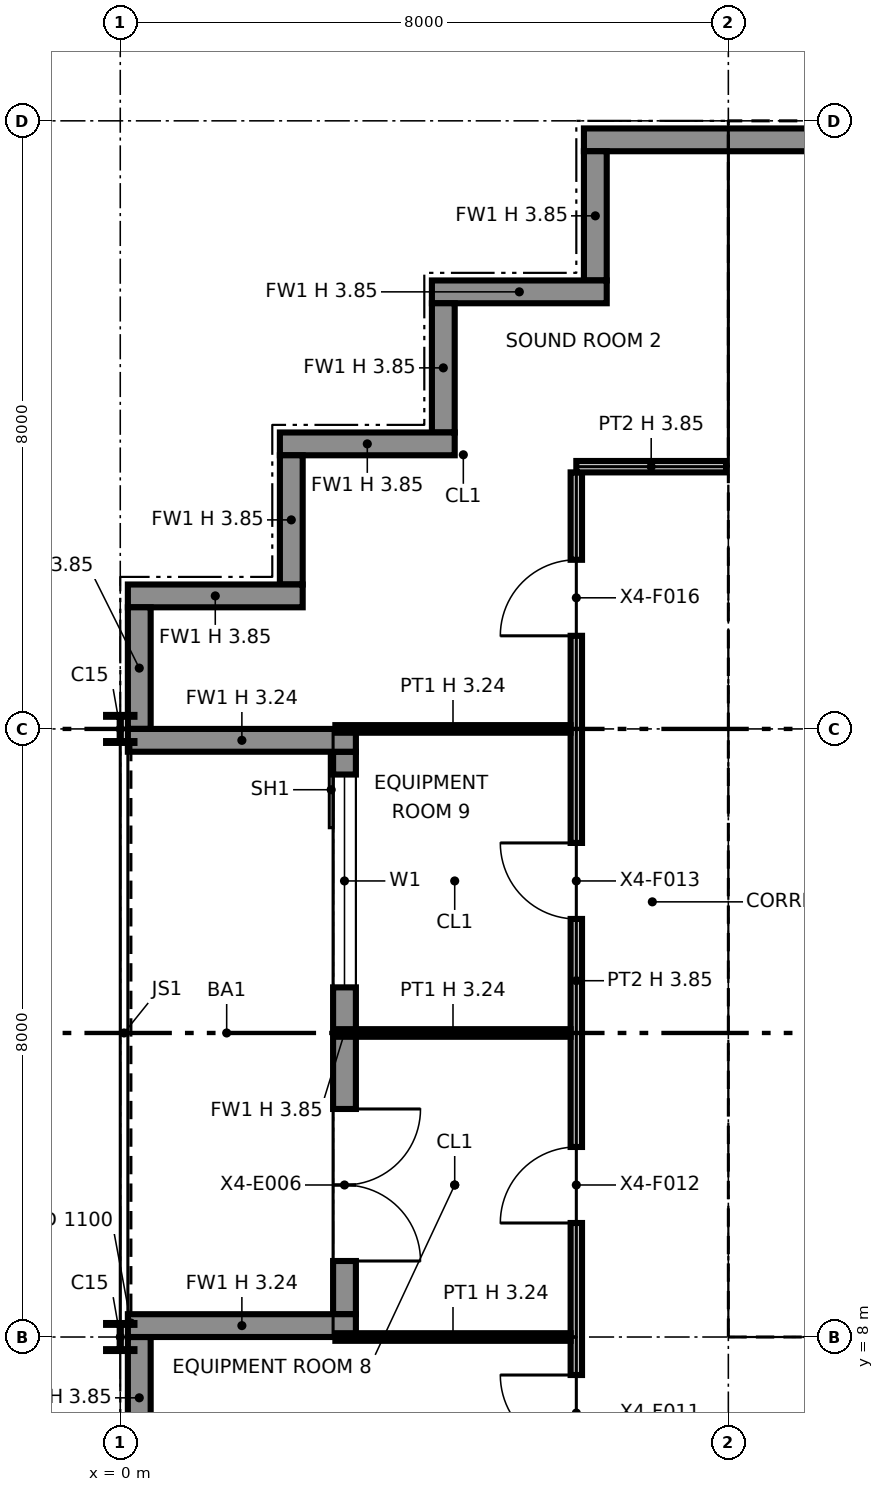
"""IFC4 building model, lengths in metres.
Left out: names, types, materials, properties, quantities, classifications, styles, units other than length and angle.
Written with IfcOpenShell. Run it as: python <this file> out.ifc"""

import sys

from ifc_helpers import new_model, si_unit, direction, frame, frame_2d, origin, origin_2d, place, context, subcontext, project, spatial, polyline, rectangle, i_section, outline, extrude, element, fill, save


model = new_model("IFC4")
c1 = context("Model", 3, precision=1e-05, world=origin(), true_north=direction((0.0, 1.0)))
c2 = subcontext(c1, "Body", "Model", "MODEL_VIEW")
j1 = project(units=[si_unit("LENGTHUNIT", "METRE"), si_unit("PLANEANGLEUNIT", "RADIAN")], contexts=[c1])
p1 = place(None, origin())
s1 = spatial("IfcSite", under=j1, at=p1, CompositionType="ELEMENT")
p2 = place(p1, origin())
s2 = spatial("IfcBuilding", under=s1, at=p2, CompositionType="ELEMENT")
p3 = place(p2, frame((0.0, 0.0, 275.0)))
s3 = spatial("IfcBuildingStorey", under=s2, at=p3, CompositionType="ELEMENT", Elevation=275.0)
for number, where, z_axis, x_axis in (
    (1, (0.0, 8.0, 0.0), (0.0, 0.0, 1.0), (1.0, 0.0, 0.0)),
    (2, (0.0, 16.0, 0.0), (0.0, 0.0, 1.0), (1.0, 0.0, 0.0)),
):
    element("IfcColumn", number, at=place(p3, frame(where, z_axis=z_axis, x_axis=x_axis)), inside=s3, PredefinedType="COLUMN", context=c2, shape_type="SweptSolid", body=[
        extrude(i_section(OverallWidth=0.373, OverallDepth=0.368, WebThickness=0.015, FlangeThickness=0.024, at=origin_2d()), origin(), (0.0, 0.0, 1.0), 3.85),
    ])
for number, where, z_axis, x_axis in (
    (3, (8.0, 8.0, 0.0), (0.0, 0.0, 1.0), (1.0, 0.0, 0.0)),
    (4, (8.0, 16.0, 0.0), (0.0, 0.0, 1.0), (1.0, 0.0, 0.0)),
):
    element("IfcColumn", number, at=place(p3, frame(where, z_axis=z_axis, x_axis=x_axis)), inside=s3, PredefinedType="COLUMN", context=c2, shape_type="SweptSolid", body=[
        extrude(i_section(OverallWidth=0.257, OverallDepth=0.363, WebThickness=0.013, FlangeThickness=0.022, at=origin_2d()), origin(), (0.0, 0.0, 1.0), 3.85),
    ])
p4 = place(p3, frame((8.0, 24.0, 0.0), z_axis=(0.0, 0.0, 1.0), x_axis=(1.0, 0.0, 0.0)))
e5 = element("IfcColumn", 5, at=p4, inside=s3, PredefinedType="COLUMN", context=c2, shape_type="SweptSolid", body=[
    extrude(i_section(OverallWidth=0.399, OverallDepth=0.386, WebThickness=0.021, FlangeThickness=0.033, at=origin_2d()), origin(), (0.0, 0.0, 1.0), 3.85),
])
p5 = place(p3, frame((32.0, 23.75, 0.0), z_axis=(0.0, 0.0, 1.0), x_axis=(-1.0, 0.0, 0.0)))
e6 = element("IfcWall", 6, at=p5, inside=s3, PredefinedType="SOLIDWALL", context=c2, shape_type="SweptSolid", body=[
    extrude(rectangle(XDim=25.9, YDim=0.3, at=frame_2d((12.95, 0.0))), origin(), (0.0, 0.0, 1.0), 3.85),
])
p6 = place(p3, frame((6.25, 23.6, 0.0), z_axis=(0.0, 0.0, 1.0), x_axis=(0.0, -1.0, 0.0)))
e7 = element("IfcWall", 7, at=p6, inside=s3, PredefinedType="SOLIDWALL", context=c2, shape_type="SweptSolid", body=[
    extrude(rectangle(XDim=1.7, YDim=0.3, at=frame_2d((0.85, 0.0))), origin(), (0.0, 0.0, 1.0), 3.85),
])
p7 = place(p3, frame((6.4, 21.75, 0.0), z_axis=(0.0, 0.0, 1.0), x_axis=(-1.0, 0.0, 0.0)))
e8 = element("IfcWall", 8, at=p7, inside=s3, PredefinedType="SOLIDWALL", context=c2, shape_type="SweptSolid", body=[
    extrude(rectangle(XDim=2.3, YDim=0.3, at=frame_2d((1.15, 0.0))), origin(), (0.0, 0.0, 1.0), 3.85),
])
p8 = place(p3, frame((4.25, 21.6, 0.0), z_axis=(0.0, 0.0, 1.0), x_axis=(0.0, -1.0, 0.0)))
e9 = element("IfcWall", 9, at=p8, inside=s3, PredefinedType="SOLIDWALL", context=c2, shape_type="SweptSolid", body=[
    extrude(rectangle(XDim=1.7, YDim=0.3, at=frame_2d((0.85, 0.0))), origin(), (0.0, 0.0, 1.0), 3.85),
])
p9 = place(p3, frame((4.4, 19.75, 0.0), z_axis=(0.0, 0.0, 1.0), x_axis=(-1.0, 0.0, 0.0)))
e10 = element("IfcWall", 10, at=p9, inside=s3, PredefinedType="SOLIDWALL", context=c2, shape_type="SweptSolid", body=[
    extrude(rectangle(XDim=2.3, YDim=0.3, at=frame_2d((1.15, 0.0))), origin(), (0.0, 0.0, 1.0), 3.85),
])
p10 = place(p3, frame((2.25, 19.6, 0.0), z_axis=(0.0, 0.0, 1.0), x_axis=(0.0, -1.0, 0.0)))
e11 = element("IfcWall", 11, at=p10, inside=s3, PredefinedType="SOLIDWALL", context=c2, shape_type="SweptSolid", body=[
    extrude(rectangle(XDim=1.7, YDim=0.3, at=frame_2d((0.85, 0.0))), origin(), (0.0, 0.0, 1.0), 3.85),
])
p11 = place(p3, frame((2.4, 17.75, 0.0), z_axis=(0.0, 0.0, 1.0), x_axis=(-1.0, 0.0, 0.0)))
e12 = element("IfcWall", 12, at=p11, inside=s3, PredefinedType="SOLIDWALL", context=c2, shape_type="SweptSolid", body=[
    extrude(rectangle(XDim=2.3, YDim=0.3, at=frame_2d((1.15, 0.0))), origin(), (0.0, 0.0, 1.0), 3.85),
])
p12 = place(p3, frame((0.25, 17.6, 0.0), z_axis=(0.0, 0.0, 1.0), x_axis=(0.0, -1.0, 0.0)))
e13 = element("IfcWall", 13, at=p12, inside=s3, PredefinedType="SOLIDWALL", context=c2, shape_type="SweptSolid", body=[
    extrude(rectangle(XDim=1.6, YDim=0.3, at=frame_2d((0.8, 0.0))), origin(), (0.0, 0.0, 1.0), 3.85),
])
p13 = place(p3, frame((2.95, 15.7, 0.0), z_axis=(0.0, 0.0, 1.0), x_axis=(0.0, -1.0, 0.0)))
e14 = element("IfcWall", 14, at=p13, inside=s3, PredefinedType="SOLIDWALL", context=c2, shape_type="SweptSolid", body=[
    extrude(rectangle(XDim=7.4, YDim=0.3, at=frame_2d((3.7, 0.0))), origin(), (0.0, 0.0, 1.0), 3.85),
])
p14 = place(p13, frame((0.3, 0.0, 0.9)))
e15 = element("IfcOpeningElement", 15, at=p14, cuts=e14, PredefinedType="OPENING", context=c2, shape_type="SweptSolid", body=[
    extrude(rectangle(XDim=2.8, YDim=2.2, at=frame_2d((1.4, 1.1))), frame((0.0, 0.16, 0.0), z_axis=(0.0, -1.0, 0.0), x_axis=(1.0, 0.0, 0.0)), (0.0, 0.0, 1.0), 0.32),
])
p15 = place(p13, frame((4.7, 0.0, 0.0)))
e16 = element("IfcOpeningElement", 16, at=p15, cuts=e14, PredefinedType="OPENING", context=c2, shape_type="SweptSolid", body=[
    extrude(rectangle(XDim=2.0, YDim=2.4, at=frame_2d((1.0, 1.2))), frame((0.0, 0.16, 0.0), z_axis=(0.0, -1.0, 0.0), x_axis=(1.0, 0.0, 0.0)), (0.0, 0.0, 1.0), 0.32),
])
for number, where, z_axis, x_axis in (
    (17, (0.1, 15.85, 0.0), (0.0, 0.0, 1.0), (1.0, 0.0, 0.0)),
    (18, (0.1, 8.15, 0.0), (0.0, 0.0, 1.0), (1.0, 0.0, 0.0)),
):
    element("IfcWall", number, at=place(p3, frame(where, z_axis=z_axis, x_axis=x_axis)), inside=s3, PredefinedType="SOLIDWALL", context=c2, shape_type="SweptSolid", body=[
        extrude(rectangle(XDim=3.0, YDim=0.3, at=frame_2d((1.5, 0.0))), origin(), (0.0, 0.0, 1.0), 3.237),
    ])
p16 = place(p3, frame((0.25, 8.0, 0.0), z_axis=(0.0, 0.0, 1.0), x_axis=(0.0, -1.0, 0.0)))
e19 = element("IfcWall", 19, at=p16, inside=s3, PredefinedType="SOLIDWALL", context=c2, shape_type="SweptSolid", body=[
    extrude(rectangle(XDim=1.6, YDim=0.3, at=frame_2d((0.8, 0.0))), origin(), (0.0, 0.0, 1.0), 3.85),
])
p17 = place(p3, frame((8.65, 8.75, 0.0), z_axis=(0.0, 0.0, 1.0), x_axis=(1.0, 0.0, 0.0)))
e20 = element("IfcWall", 20, at=p17, inside=s3, PredefinedType="PARTITIONING", context=c2, shape_type="SweptSolid", body=[
    extrude(outline(polyline([(0.0, 0.0), (14.7, 0.0), (14.7, 3.85), (7.438, 3.85), (7.437, 3.318), (7.263, 3.318), (7.262, 3.85), (0.0, 3.85), (0.0, 0.0)])), frame((0.0, 0.1, 0.0), z_axis=(0.0, -1.0, 0.0), x_axis=(1.0, 0.0, 0.0)), (0.0, 0.0, 1.0), 0.2),
])
p18 = place(p17, frame((1.3, 0.0, 0.0)))
e21 = element("IfcOpeningElement", 21, at=p18, cuts=e20, PredefinedType="OPENING", context=c2, shape_type="SweptSolid", body=[
    extrude(rectangle(XDim=1.4, YDim=2.1, at=frame_2d((0.7, 1.05))), frame((0.0, 0.11, 0.0), z_axis=(0.0, -1.0, 0.0), x_axis=(1.0, 0.0, 0.0)), (0.0, 0.0, 1.0), 0.22),
])
p19 = place(p17, frame((4.6, 0.0, 0.0)))
e22 = element("IfcOpeningElement", 22, at=p19, cuts=e20, PredefinedType="OPENING", context=c2, shape_type="SweptSolid", body=[
    extrude(rectangle(XDim=1.4, YDim=2.1, at=frame_2d((0.7, 1.05))), frame((0.0, 0.11, 0.0), z_axis=(0.0, -1.0, 0.0), x_axis=(1.0, 0.0, 0.0)), (0.0, 0.0, 1.0), 0.22),
])
p20 = place(p17, frame((10.4, 0.0, 0.0)))
e23 = element("IfcOpeningElement", 23, at=p20, cuts=e20, PredefinedType="OPENING", context=c2, shape_type="SweptSolid", body=[
    extrude(rectangle(XDim=1.2, YDim=2.1, at=frame_2d((0.6, 1.05))), frame((0.0, 0.11, 0.0), z_axis=(0.0, -1.0, 0.0), x_axis=(1.0, 0.0, 0.0)), (0.0, 0.0, 1.0), 0.22),
])
p21 = place(p3, frame((8.75, 8.85, 0.0), z_axis=(0.0, 0.0, 1.0), x_axis=(0.0, 1.0, 0.0)))
e24 = element("IfcWall", 24, at=p21, inside=s3, PredefinedType="PARTITIONING", context=c2, shape_type="SweptSolid", body=[
    extrude(outline(polyline([(0.0, 0.0), (14.3, 0.0), (14.3, 3.85), (10.225, 3.85), (10.224, 3.44), (10.076, 3.44), (10.075, 3.85), (7.238, 3.85), (7.237, 3.318), (7.063, 3.318), (7.062, 3.85), (0.0, 3.85), (0.0, 0.0)])), frame((0.0, 0.1, 0.0), z_axis=(0.0, -1.0, 0.0), x_axis=(1.0, 0.0, 0.0)), (0.0, 0.0, 1.0), 0.2),
])
p22 = place(p21, frame((8.3, 0.0, 0.0)))
e25 = element("IfcOpeningElement", 25, at=p22, cuts=e24, PredefinedType="OPENING", context=c2, shape_type="SweptSolid", body=[
    extrude(rectangle(XDim=1.8, YDim=2.1, at=frame_2d((0.9, 1.05))), frame((0.0, 0.11, 0.0), z_axis=(0.0, -1.0, 0.0), x_axis=(1.0, 0.0, 0.0)), (0.0, 0.0, 1.0), 0.22),
])
p23 = place(p3, frame((8.65, 23.25, 0.0), z_axis=(0.0, 0.0, 1.0), x_axis=(1.0, 0.0, 0.0)))
e26 = element("IfcWall", 26, at=p23, inside=s3, PredefinedType="PARTITIONING", context=c2, shape_type="SweptSolid", body=[
    extrude(outline(polyline([(0.0, 0.0), (14.7, 0.0), (14.7, 3.85), (7.438, 3.85), (7.437, 3.318), (7.263, 3.318), (7.262, 3.85), (0.0, 3.85), (0.0, 0.0)])), frame((0.0, 0.1, 0.0), z_axis=(0.0, -1.0, 0.0), x_axis=(1.0, 0.0, 0.0)), (0.0, 0.0, 1.0), 0.2),
])
p24 = place(p3, frame((8.85, 16.0, 0.0), z_axis=(0.0, 0.0, 1.0), x_axis=(1.0, 0.0, 0.0)))
e27 = element("IfcWall", 27, at=p24, inside=s3, PredefinedType="PARTITIONING", context=c2, shape_type="SweptSolid", body=[
    extrude(rectangle(XDim=6.958, YDim=0.6, at=frame_2d((3.479, 0.0))), origin(), (0.0, 0.0, 1.0), 3.318),
])
p25 = place(p3, frame((8.85, 19.9, 0.0), z_axis=(0.0, 0.0, 1.0), x_axis=(1.0, 0.0, 0.0)))
e28 = element("IfcWall", 28, at=p25, inside=s3, PredefinedType="PARTITIONING", context=c2, shape_type="SweptSolid", body=[
    extrude(outline(polyline([(0.0, 0.0), (14.3, 0.0), (14.3, 3.85), (7.238, 3.85), (7.237, 3.318), (7.063, 3.318), (7.062, 3.85), (0.0, 3.85), (0.0, 0.0)])), frame((0.0, 0.1, 0.0), z_axis=(0.0, -1.0, 0.0), x_axis=(1.0, 0.0, 0.0)), (0.0, 0.0, 1.0), 0.2),
])
p26 = place(p25, frame((2.125, 0.0, 0.0)))
e29 = element("IfcOpeningElement", 29, at=p26, cuts=e28, PredefinedType="OPENING", context=c2, shape_type="SweptSolid", body=[
    extrude(rectangle(XDim=0.9, YDim=2.1, at=frame_2d((0.45, 1.05))), frame((0.0, 0.11, 0.0), z_axis=(0.0, -1.0, 0.0), x_axis=(1.0, 0.0, 0.0)), (0.0, 0.0, 1.0), 0.22),
])
p27 = place(p25, frame((5.65, 0.0, 0.0)))
e30 = element("IfcOpeningElement", 30, at=p27, cuts=e28, PredefinedType="OPENING", context=c2, shape_type="SweptSolid", body=[
    extrude(rectangle(XDim=1.1, YDim=2.1, at=frame_2d((0.55, 1.05))), frame((0.0, 0.11, 0.0), z_axis=(0.0, -1.0, 0.0), x_axis=(1.0, 0.0, 0.0)), (0.0, 0.0, 1.0), 0.22),
])
p28 = place(p25, frame((7.95, 0.0, 0.0)))
e31 = element("IfcOpeningElement", 31, at=p28, cuts=e28, PredefinedType="OPENING", context=c2, shape_type="SweptSolid", body=[
    extrude(rectangle(XDim=1.1, YDim=2.1, at=frame_2d((0.55, 1.05))), frame((0.0, 0.11, 0.0), z_axis=(0.0, -1.0, 0.0), x_axis=(1.0, 0.0, 0.0)), (0.0, 0.0, 1.0), 0.22),
])
p29 = place(p25, frame((10.25, 0.0, 0.0)))
e32 = element("IfcOpeningElement", 32, at=p29, cuts=e28, PredefinedType="OPENING", context=c2, shape_type="SweptSolid", body=[
    extrude(rectangle(XDim=1.1, YDim=2.1, at=frame_2d((0.55, 1.05))), frame((0.0, 0.11, 0.0), z_axis=(0.0, -1.0, 0.0), x_axis=(1.0, 0.0, 0.0)), (0.0, 0.0, 1.0), 0.22),
])
p30 = place(p25, frame((12.625, 0.0, 0.0)))
e33 = element("IfcOpeningElement", 33, at=p30, cuts=e28, PredefinedType="OPENING", context=c2, shape_type="SweptSolid", body=[
    extrude(rectangle(XDim=1.1, YDim=2.1, at=frame_2d((0.55, 1.05))), frame((0.0, 0.11, 0.0), z_axis=(0.0, -1.0, 0.0), x_axis=(1.0, 0.0, 0.0)), (0.0, 0.0, 1.0), 0.22),
])
p31 = place(p3, frame((6.0, 6.0, 0.0), z_axis=(0.0, 0.0, 1.0), x_axis=(0.0, 1.0, 0.0)))
e34 = element("IfcWall", 34, at=p31, inside=s3, PredefinedType="PARTITIONING", context=c2, shape_type="SweptSolid", body=[
    extrude(outline(polyline([(0.0, 0.0), (13.375, 0.0), (13.375, 3.85), (10.3, 3.85), (10.298, 3.238), (9.702, 3.238), (9.7, 3.85), (6.3, 3.85), (6.298, 3.238), (5.702, 3.238), (5.7, 3.85), (2.3, 3.85), (2.298, 3.238), (1.702, 3.238), (1.7, 3.85), (0.0, 3.85), (0.0, 0.0)])), frame((0.0, 0.075, 0.0), z_axis=(0.0, -1.0, 0.0), x_axis=(1.0, 0.0, 0.0)), (0.0, 0.0, 1.0), 0.15),
])
p32 = place(p31, frame((0.5, 0.0, 0.0)))
e35 = element("IfcOpeningElement", 35, at=p32, cuts=e34, PredefinedType="OPENING", context=c2, shape_type="SweptSolid", body=[
    extrude(rectangle(XDim=1.0, YDim=2.1, at=frame_2d((0.5, 1.05))), frame((0.0, 0.085, 0.0), z_axis=(0.0, -1.0, 0.0), x_axis=(1.0, 0.0, 0.0)), (0.0, 0.0, 1.0), 0.17),
])
p33 = place(p31, frame((3.5, 0.0, 0.0)))
e36 = element("IfcOpeningElement", 36, at=p33, cuts=e34, PredefinedType="OPENING", context=c2, shape_type="SweptSolid", body=[
    extrude(rectangle(XDim=1.0, YDim=2.1, at=frame_2d((0.5, 1.05))), frame((0.0, 0.085, 0.0), z_axis=(0.0, -1.0, 0.0), x_axis=(1.0, 0.0, 0.0)), (0.0, 0.0, 1.0), 0.17),
])
p34 = place(p31, frame((7.5, 0.0, 0.0)))
e37 = element("IfcOpeningElement", 37, at=p34, cuts=e34, PredefinedType="OPENING", context=c2, shape_type="SweptSolid", body=[
    extrude(rectangle(XDim=1.0, YDim=2.1, at=frame_2d((0.5, 1.05))), frame((0.0, 0.085, 0.0), z_axis=(0.0, -1.0, 0.0), x_axis=(1.0, 0.0, 0.0)), (0.0, 0.0, 1.0), 0.17),
])
p35 = place(p31, frame((11.225, 0.0, 0.0)))
e38 = element("IfcOpeningElement", 38, at=p35, cuts=e34, PredefinedType="OPENING", context=c2, shape_type="SweptSolid", body=[
    extrude(rectangle(XDim=1.0, YDim=2.1, at=frame_2d((0.5, 1.05))), frame((0.0, 0.085, 0.0), z_axis=(0.0, -1.0, 0.0), x_axis=(1.0, 0.0, 0.0)), (0.0, 0.0, 1.0), 0.17),
])
for number, where, z_axis, x_axis in (
    (39, (2.83, 8.0, 0.0), (0.0, 0.0, 1.0), (1.0, 0.0, 0.0)),
    (40, (2.83, 12.0, 0.0), (0.0, 0.0, 1.0), (1.0, 0.0, 0.0)),
    (41, (2.83, 16.0, 0.0), (0.0, 0.0, 1.0), (1.0, 0.0, 0.0)),
):
    element("IfcWall", number, at=place(p3, frame(where, z_axis=z_axis, x_axis=x_axis)), inside=s3, PredefinedType="PARTITIONING", context=c2, shape_type="SweptSolid", body=[
        extrude(rectangle(XDim=3.095, YDim=0.1, at=frame_2d((1.547, 0.0))), origin(), (0.0, 0.0, 1.0), 3.238),
    ])
p36 = place(p3, frame((6.0, 19.45, 0.0), z_axis=(0.0, 0.0, 1.0), x_axis=(1.0, 0.0, 0.0)))
e42 = element("IfcWall", 42, at=p36, inside=s3, PredefinedType="PARTITIONING", context=c2, shape_type="SweptSolid", body=[
    extrude(rectangle(XDim=1.97, YDim=0.15, at=frame_2d((0.985, 0.0))), origin(), (0.0, 0.0, 1.0), 3.85),
])
p37 = place(p14, origin())
e43 = element("IfcWindow", 43, at=p37, inside=s3, PartitioningType="SINGLE_PANEL", PredefinedType="WINDOW", context=c2, shape_type="SweptSolid", body=[
    extrude(rectangle(XDim=2.8, YDim=2.2, at=frame_2d((1.4, 1.1))), frame((0.0, 0.03, 0.0), z_axis=(0.0, -1.0, 0.0), x_axis=(1.0, 0.0, 0.0)), (0.0, 0.0, 1.0), 0.06),
])
fill(e15, e43)
p38 = place(p15, origin())
e44 = element("IfcDoor", 44, at=p38, inside=s3, OperationType="DOUBLE_DOOR_SINGLE_SWING", PredefinedType="DOOR", context=c2, shape_type="SweptSolid", body=[
    extrude(rectangle(XDim=2.0, YDim=2.4, at=frame_2d((1.0, 1.2))), frame((0.0, 0.025, 0.0), z_axis=(0.0, -1.0, 0.0), x_axis=(1.0, 0.0, 0.0)), (0.0, 0.0, 1.0), 0.05),
])
fill(e16, e44)
p39 = place(p22, origin())
e45 = element("IfcDoor", 45, at=p39, inside=s3, OperationType="DOUBLE_DOOR_SINGLE_SWING", PredefinedType="NOTDEFINED", context=c2, shape_type="SweptSolid", body=[
    extrude(rectangle(XDim=1.8, YDim=2.1, at=frame_2d((0.9, 1.05))), frame((0.0, 0.025, 0.0), z_axis=(0.0, -1.0, 0.0), x_axis=(1.0, 0.0, 0.0)), (0.0, 0.0, 1.0), 0.05),
])
fill(e25, e45)
p40 = place(p32, origin())
e46 = element("IfcDoor", 46, at=p40, inside=s3, OperationType="SINGLE_SWING_RIGHT", PredefinedType="DOOR", context=c2, shape_type="SweptSolid", body=[
    extrude(rectangle(XDim=1.0, YDim=2.1, at=frame_2d((0.5, 1.05))), frame((0.0, 0.025, 0.0), z_axis=(0.0, -1.0, 0.0), x_axis=(1.0, 0.0, 0.0)), (0.0, 0.0, 1.0), 0.05),
])
fill(e35, e46)
p41 = place(p33, origin())
e47 = element("IfcDoor", 47, at=p41, inside=s3, OperationType="SINGLE_SWING_LEFT", PredefinedType="DOOR", context=c2, shape_type="SweptSolid", body=[
    extrude(rectangle(XDim=1.0, YDim=2.1, at=frame_2d((0.5, 1.05))), frame((0.0, 0.025, 0.0), z_axis=(0.0, -1.0, 0.0), x_axis=(1.0, 0.0, 0.0)), (0.0, 0.0, 1.0), 0.05),
])
fill(e36, e47)
p42 = place(p34, origin())
e48 = element("IfcDoor", 48, at=p42, inside=s3, OperationType="SINGLE_SWING_RIGHT", PredefinedType="DOOR", context=c2, shape_type="SweptSolid", body=[
    extrude(rectangle(XDim=1.0, YDim=2.1, at=frame_2d((0.5, 1.05))), frame((0.0, 0.025, 0.0), z_axis=(0.0, -1.0, 0.0), x_axis=(1.0, 0.0, 0.0)), (0.0, 0.0, 1.0), 0.05),
])
fill(e37, e48)
p43 = place(p35, origin())
e49 = element("IfcDoor", 49, at=p43, inside=s3, OperationType="SINGLE_SWING_LEFT", PredefinedType="DOOR", context=c2, shape_type="SweptSolid", body=[
    extrude(rectangle(XDim=1.0, YDim=2.1, at=frame_2d((0.5, 1.05))), frame((0.0, 0.025, 0.0), z_axis=(0.0, -1.0, 0.0), x_axis=(1.0, 0.0, 0.0)), (0.0, 0.0, 1.0), 0.05),
])
fill(e38, e49)
save(model, sys.argv[1])
